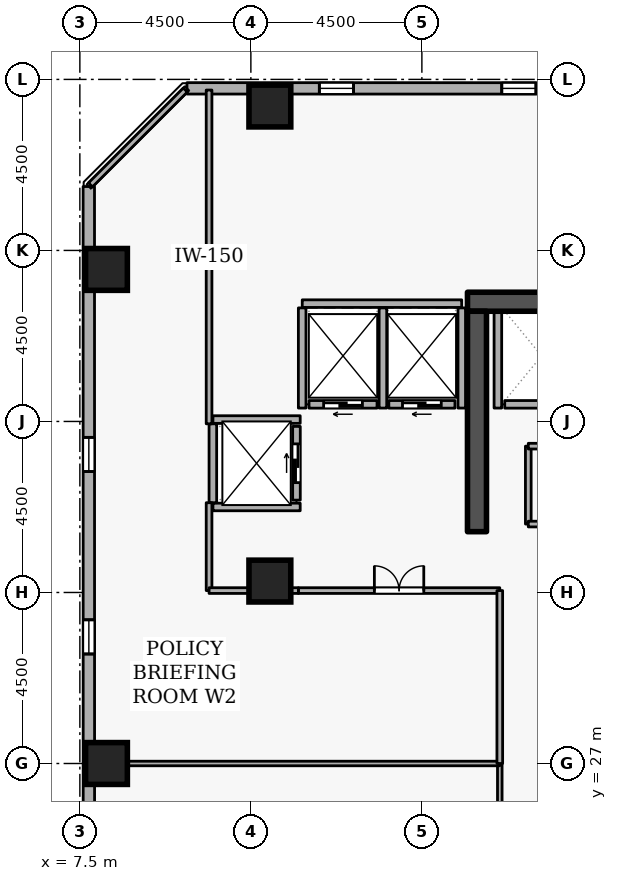
"""IFC4 building model, lengths in metres.
Left out: names, types, materials, properties, quantities, classifications, styles, units other than length and angle.
Written with IfcOpenShell. Run it as: python <this file> out.ifc"""

import sys

from ifc_helpers import new_model, si_unit, direction, frame, frame_2d, origin, origin_2d, place, context, subcontext, project, spatial, rectangle, extrude, element, fill, save


model = new_model("IFC4")
c1 = context("Model", 3, precision=1e-05, world=origin(), true_north=direction((0.0, 1.0)))
c2 = subcontext(c1, "Body", "Model", "MODEL_VIEW")
j1 = project(units=[si_unit("LENGTHUNIT", "METRE"), si_unit("PLANEANGLEUNIT", "RADIAN")], contexts=[c1])
p1 = place(None, origin())
s1 = spatial("IfcSite", under=j1, at=p1, CompositionType="ELEMENT")
p2 = place(p1, origin())
s2 = spatial("IfcBuilding", under=s1, at=p2, CompositionType="ELEMENT")
p3 = place(p2, frame((0.0, 0.0, 152.7)))
s3 = spatial("IfcBuildingStorey", under=s2, at=p3, CompositionType="ELEMENT", Elevation=152.7)
p4 = place(p3, frame((17.7, 39.15, 0.0), z_axis=(0.0, 0.0, 1.0), x_axis=(1.0, 0.0, 0.0)))
e1 = element("IfcWall", 1, at=p4, inside=s3, PredefinedType="SHEAR", context=c2, shape_type="SweptSolid", body=[
    extrude(rectangle(XDim=15.6, YDim=0.5, at=frame_2d((7.8, 0.0))), origin(), (0.0, 0.0, 1.0), 3.6),
])
p5 = place(p3, frame((17.95, 33.1, 0.0), z_axis=(0.0, 0.0, 1.0), x_axis=(0.0, 1.0, 0.0)))
e2 = element("IfcWall", 2, at=p5, inside=s3, PredefinedType="SHEAR", context=c2, shape_type="SweptSolid", body=[
    extrude(rectangle(XDim=5.8, YDim=0.5, at=frame_2d((2.9, 0.0))), origin(), (0.0, 0.0, 1.0), 3.6),
])
for number, where, z_axis, x_axis in (
    (3, (12.5, 44.3, 0.0), (0.0, 0.0, 1.0), (1.0, 0.0, 0.0)),
    (4, (8.2, 27.0, 0.0), (0.0, 0.0, 1.0), (1.0, 0.0, 0.0)),
    (5, (8.2, 40.0, 0.0), (0.0, 0.0, 1.0), (1.0, 0.0, 0.0)),
    (6, (12.5, 31.8, 0.0), (0.0, 0.0, 1.0), (1.0, 0.0, 0.0)),
):
    element("IfcColumn", number, at=place(p3, frame(where, z_axis=z_axis, x_axis=x_axis)), inside=s3, PredefinedType="COLUMN", context=c2, shape_type="SweptSolid", body=[
        extrude(rectangle(XDim=1.1, YDim=1.1, at=origin_2d()), origin(), (0.0, 0.0, 1.0), 3.6),
    ])
p6 = place(p3, frame((45.302, 44.76, 0.0), z_axis=(0.0, 0.0, 1.0), x_axis=(-0.999999991209, 0.000132597301, 0.0)))
e7 = element("IfcWall", 7, at=p6, inside=s3, PredefinedType="STANDARD", context=c2, shape_type="SweptSolid", body=[
    extrude(rectangle(XDim=34.983, YDim=0.3, at=frame_2d((17.492, 0.0))), origin(), (0.0, 0.0, 1.0), 2.7),
])
p7 = place(p6, frame((1.8, 0.0, 0.72)))
e8 = element("IfcOpeningElement", 8, at=p7, cuts=e7, PredefinedType="OPENING", context=c2, shape_type="SweptSolid", body=[
    extrude(rectangle(XDim=0.9, YDim=1.75, at=frame_2d((0.45, 0.875))), frame((0.0, 0.16, 0.0), z_axis=(0.0, -1.0, 0.0), x_axis=(1.0, 0.0, 0.0)), (0.0, 0.0, 1.0), 0.32),
])
p8 = place(p6, frame((11.4, 0.0, 0.72)))
e9 = element("IfcOpeningElement", 9, at=p8, cuts=e7, PredefinedType="OPENING", context=c2, shape_type="SweptSolid", body=[
    extrude(rectangle(XDim=0.9, YDim=1.75, at=frame_2d((0.45, 0.875))), frame((0.0, 0.16, 0.0), z_axis=(0.0, -1.0, 0.0), x_axis=(1.0, 0.0, 0.0)), (0.0, 0.0, 1.0), 0.32),
])
p9 = place(p6, frame((16.2, 0.0, 0.72)))
e10 = element("IfcOpeningElement", 10, at=p9, cuts=e7, PredefinedType="OPENING", context=c2, shape_type="SweptSolid", body=[
    extrude(rectangle(XDim=0.9, YDim=1.75, at=frame_2d((0.45, 0.875))), frame((0.0, 0.16, 0.0), z_axis=(0.0, -1.0, 0.0), x_axis=(1.0, 0.0, 0.0)), (0.0, 0.0, 1.0), 0.32),
])
p10 = place(p6, frame((21.0, 0.0, 0.72)))
e11 = element("IfcOpeningElement", 11, at=p10, cuts=e7, PredefinedType="OPENING", context=c2, shape_type="SweptSolid", body=[
    extrude(rectangle(XDim=0.9, YDim=1.75, at=frame_2d((0.45, 0.875))), frame((0.0, 0.16, 0.0), z_axis=(0.0, -1.0, 0.0), x_axis=(1.0, 0.0, 0.0)), (0.0, 0.0, 1.0), 0.32),
])
p11 = place(p6, frame((25.8, 0.0, 0.72)))
e12 = element("IfcOpeningElement", 12, at=p11, cuts=e7, PredefinedType="OPENING", context=c2, shape_type="SweptSolid", body=[
    extrude(rectangle(XDim=0.9, YDim=1.75, at=frame_2d((0.45, 0.875))), frame((0.0, 0.16, 0.0), z_axis=(0.0, -1.0, 0.0), x_axis=(1.0, 0.0, 0.0)), (0.0, 0.0, 1.0), 0.32),
])
p12 = place(p6, frame((30.6, 0.0, 0.72)))
e13 = element("IfcOpeningElement", 13, at=p12, cuts=e7, PredefinedType="OPENING", context=c2, shape_type="SweptSolid", body=[
    extrude(rectangle(XDim=0.9, YDim=1.75, at=frame_2d((0.45, 0.875))), frame((0.0, 0.16, 0.0), z_axis=(0.0, -1.0, 0.0), x_axis=(1.0, 0.0, 0.0)), (0.0, 0.0, 1.0), 0.32),
])
p13 = place(p3, frame((7.735, 42.181, 0.0), z_axis=(0.0, 0.0, 1.0), x_axis=(0.000132597301, -0.999999991209, 0.0)))
e14 = element("IfcWall", 14, at=p13, inside=s3, PredefinedType="STANDARD", context=c2, shape_type="SweptSolid", body=[
    extrude(rectangle(XDim=34.983, YDim=0.3, at=frame_2d((17.492, 0.0))), origin(), (0.0, 0.0, 1.0), 2.7),
])
p14 = place(p13, frame((6.6, 0.0, 0.72)))
e15 = element("IfcOpeningElement", 15, at=p14, cuts=e14, PredefinedType="OPENING", context=c2, shape_type="SweptSolid", body=[
    extrude(rectangle(XDim=0.9, YDim=1.75, at=frame_2d((0.45, 0.875))), frame((0.0, 0.16, 0.0), z_axis=(0.0, -1.0, 0.0), x_axis=(1.0, 0.0, 0.0)), (0.0, 0.0, 1.0), 0.32),
])
p15 = place(p13, frame((11.4, 0.0, 0.72)))
e16 = element("IfcOpeningElement", 16, at=p15, cuts=e14, PredefinedType="OPENING", context=c2, shape_type="SweptSolid", body=[
    extrude(rectangle(XDim=0.9, YDim=1.75, at=frame_2d((0.45, 0.875))), frame((0.0, 0.16, 0.0), z_axis=(0.0, -1.0, 0.0), x_axis=(1.0, 0.0, 0.0)), (0.0, 0.0, 1.0), 0.32),
])
p16 = place(p13, frame((21.0, 0.0, 0.72)))
e17 = element("IfcOpeningElement", 17, at=p16, cuts=e14, PredefinedType="OPENING", context=c2, shape_type="SweptSolid", body=[
    extrude(rectangle(XDim=0.9, YDim=1.75, at=frame_2d((0.45, 0.875))), frame((0.0, 0.16, 0.0), z_axis=(0.0, -1.0, 0.0), x_axis=(1.0, 0.0, 0.0)), (0.0, 0.0, 1.0), 0.32),
])
p17 = place(p13, frame((25.8, 0.0, 0.72)))
e18 = element("IfcOpeningElement", 18, at=p17, cuts=e14, PredefinedType="OPENING", context=c2, shape_type="SweptSolid", body=[
    extrude(rectangle(XDim=0.9, YDim=1.75, at=frame_2d((0.45, 0.875))), frame((0.0, 0.16, 0.0), z_axis=(0.0, -1.0, 0.0), x_axis=(1.0, 0.0, 0.0)), (0.0, 0.0, 1.0), 0.32),
])
p18 = place(p13, frame((30.6, 0.0, 0.72)))
e19 = element("IfcOpeningElement", 19, at=p18, cuts=e14, PredefinedType="OPENING", context=c2, shape_type="SweptSolid", body=[
    extrude(rectangle(XDim=0.9, YDim=1.75, at=frame_2d((0.45, 0.875))), frame((0.0, 0.16, 0.0), z_axis=(0.0, -1.0, 0.0), x_axis=(1.0, 0.0, 0.0)), (0.0, 0.0, 1.0), 0.32),
])
p19 = place(p3, frame((20.62, 36.45, 0.0), z_axis=(0.0, 0.0, 1.0), x_axis=(-1.0, 0.0, 0.0)))
e20 = element("IfcWall", 20, at=p19, inside=s3, PredefinedType="STANDARD", context=c2, shape_type="SweptSolid", body=[
    extrude(rectangle(XDim=1.94, YDim=0.2, at=frame_2d((0.97, 0.0))), origin(), (0.0, 0.0, 1.0), 3.34),
])
p20 = place(p3, frame((17.37, 36.45, 0.0), z_axis=(0.0, 0.0, 1.0), x_axis=(-1.0, 0.0, 0.0)))
e21 = element("IfcWall", 21, at=p20, inside=s3, PredefinedType="STANDARD", context=c2, shape_type="SweptSolid", body=[
    extrude(rectangle(XDim=1.74, YDim=0.2, at=frame_2d((0.87, 0.0))), origin(), (0.0, 0.0, 1.0), 3.34),
])
p21 = place(p20, frame((0.36, 0.0, 0.0)))
e22 = element("IfcOpeningElement", 22, at=p21, cuts=e21, PredefinedType="OPENING", context=c2, shape_type="SweptSolid", body=[
    extrude(rectangle(XDim=1.02, YDim=2.06, at=frame_2d((0.51, 1.03))), frame((0.0, 0.11, 0.0), z_axis=(0.0, -1.0, 0.0), x_axis=(1.0, 0.0, 0.0)), (0.0, 0.0, 1.0), 0.22),
])
p22 = place(p3, frame((15.32, 36.45, 0.0), z_axis=(0.0, 0.0, 1.0), x_axis=(-1.0, 0.0, 0.0)))
e23 = element("IfcWall", 23, at=p22, inside=s3, PredefinedType="STANDARD", context=c2, shape_type="SweptSolid", body=[
    extrude(rectangle(XDim=1.79, YDim=0.2, at=frame_2d((0.895, 0.0))), origin(), (0.0, 0.0, 1.0), 3.34),
])
p23 = place(p22, frame((0.385, 0.0, 0.0)))
e24 = element("IfcOpeningElement", 24, at=p23, cuts=e23, PredefinedType="OPENING", context=c2, shape_type="SweptSolid", body=[
    extrude(rectangle(XDim=1.02, YDim=2.06, at=frame_2d((0.51, 1.03))), frame((0.0, 0.11, 0.0), z_axis=(0.0, -1.0, 0.0), x_axis=(1.0, 0.0, 0.0)), (0.0, 0.0, 1.0), 0.22),
])
p24 = place(p3, frame((13.2, 33.93, 0.0), z_axis=(0.0, 0.0, 1.0), x_axis=(0.0, 1.0, 0.0)))
e25 = element("IfcWall", 25, at=p24, inside=s3, PredefinedType="STANDARD", context=c2, shape_type="SweptSolid", body=[
    extrude(rectangle(XDim=1.94, YDim=0.2, at=frame_2d((0.97, 0.0))), origin(), (0.0, 0.0, 1.0), 3.34),
])
p25 = place(p24, frame((0.46, 0.0, 0.0)))
e26 = element("IfcOpeningElement", 26, at=p25, cuts=e25, PredefinedType="OPENING", context=c2, shape_type="SweptSolid", body=[
    extrude(rectangle(XDim=1.02, YDim=2.06, at=frame_2d((0.51, 1.03))), frame((0.0, 0.11, 0.0), z_axis=(0.0, -1.0, 0.0), x_axis=(1.0, 0.0, 0.0)), (0.0, 0.0, 1.0), 0.22),
])
p26 = place(p3, frame((18.5, 36.352, 0.0), z_axis=(0.0, 0.0, 1.0), x_axis=(0.0, 1.0, 0.0)))
e27 = element("IfcWall", 27, at=p26, inside=s3, PredefinedType="STANDARD", context=c2, shape_type="SweptSolid", body=[
    extrude(rectangle(XDim=2.536, YDim=0.2, at=frame_2d((1.268, 0.0))), origin(), (0.0, 0.0, 1.0), 3.34),
])
p27 = place(p3, frame((13.352, 39.1, 0.0), z_axis=(0.0, 0.0, 1.0), x_axis=(1.0, 0.0, 0.0)))
e28 = element("IfcWall", 28, at=p27, inside=s3, PredefinedType="STANDARD", context=c2, shape_type="SweptSolid", body=[
    extrude(rectangle(XDim=4.196, YDim=0.2, at=frame_2d((2.098, 0.0))), origin(), (0.0, 0.0, 1.0), 3.34),
])
p28 = place(p3, frame((17.55, 36.352, 0.0), z_axis=(0.0, 0.0, 1.0), x_axis=(0.0, 1.0, 0.0)))
e29 = element("IfcWall", 29, at=p28, inside=s3, PredefinedType="STANDARD", context=c2, shape_type="SweptSolid", body=[
    extrude(rectangle(XDim=2.636, YDim=0.2, at=frame_2d((1.318, 0.0))), origin(), (0.0, 0.0, 1.0), 2.545),
])
for number, where, z_axis, x_axis in (
    (30, (15.475, 36.352, 0.0), (0.0, 0.0, 1.0), (0.0, 1.0, 0.0)),
    (31, (13.35, 36.352, 0.0), (0.0, 0.0, 1.0), (0.0, 1.0, 0.0)),
):
    element("IfcWall", number, at=place(p3, frame(where, z_axis=z_axis, x_axis=x_axis)), inside=s3, PredefinedType="STANDARD", context=c2, shape_type="SweptSolid", body=[
        extrude(rectangle(XDim=2.636, YDim=0.2, at=frame_2d((1.318, 0.0))), origin(), (0.0, 0.0, 1.0), 3.34),
    ])
for number, where, z_axis, x_axis in (
    (32, (11.002, 36.05, 0.0), (0.0, 0.0, 1.0), (1.0, 0.0, 0.0)),
    (33, (11.002, 33.75, 0.0), (0.0, 0.0, 1.0), (1.0, 0.0, 0.0)),
):
    element("IfcWall", number, at=place(p3, frame(where, z_axis=z_axis, x_axis=x_axis)), inside=s3, PredefinedType="STANDARD", context=c2, shape_type="SweptSolid", body=[
        extrude(rectangle(XDim=2.296, YDim=0.2, at=frame_2d((1.148, 0.0))), origin(), (0.0, 0.0, 1.0), 3.34),
    ])
p29 = place(p3, frame((11.0, 33.862, 0.0), z_axis=(0.0, 0.0, 1.0), x_axis=(0.0, 1.0, 0.0)))
e34 = element("IfcWall", 34, at=p29, inside=s3, PredefinedType="STANDARD", context=c2, shape_type="SweptSolid", body=[
    extrude(rectangle(XDim=2.076, YDim=0.2, at=frame_2d((1.038, 0.0))), origin(), (0.0, 0.0, 1.0), 3.34),
])
p30 = place(p3, frame((19.3, 33.3, 0.0), z_axis=(0.0, 0.0, 1.0), x_axis=(0.0, 1.0, 0.0)))
e35 = element("IfcWall", 35, at=p30, inside=s3, PredefinedType="PARTITIONING", context=c2, shape_type="SweptSolid", body=[
    extrude(rectangle(XDim=2.05, YDim=0.15, at=frame_2d((1.025, 0.0))), origin(), (0.0, 0.0, 1.0), 3.34),
])
p31 = place(p3, frame((19.3, 35.35, 0.0), z_axis=(0.0, 0.0, 1.0), x_axis=(1.0, 0.0, 0.0)))
e36 = element("IfcWall", 36, at=p31, inside=s3, PredefinedType="PARTITIONING", context=c2, shape_type="SweptSolid", body=[
    extrude(rectangle(XDim=3.25, YDim=0.15, at=frame_2d((1.625, 0.0))), origin(), (0.0, 0.0, 1.0), 3.34),
])
p32 = place(p3, frame((22.55, 33.3, 0.0), z_axis=(0.0, 0.0, 1.0), x_axis=(-1.0, 0.0, 0.0)))
e37 = element("IfcWall", 37, at=p32, inside=s3, PredefinedType="PARTITIONING", context=c2, shape_type="SweptSolid", body=[
    extrude(rectangle(XDim=3.25, YDim=0.15, at=frame_2d((1.625, 0.0))), origin(), (0.0, 0.0, 1.0), 3.34),
])
p33 = place(p32, frame((1.165, 0.0, 0.0)))
e38 = element("IfcOpeningElement", 38, at=p33, cuts=e37, PredefinedType="OPENING", context=c2, shape_type="SweptSolid", body=[
    extrude(rectangle(XDim=0.92, YDim=2.08, at=frame_2d((0.46, 1.04))), frame((0.0, 0.085, 0.0), z_axis=(0.0, -1.0, 0.0), x_axis=(1.0, 0.0, 0.0)), (0.0, 0.0, 1.0), 0.17),
])
p34 = place(p3, frame((18.55, 27.0, 0.0), z_axis=(0.0, 0.0, 1.0), x_axis=(0.0, -1.0, 0.0)))
e39 = element("IfcWall", 39, at=p34, inside=s3, PredefinedType="PARTITIONING", context=c2, shape_type="SweptSolid", body=[
    extrude(rectangle(XDim=4.55, YDim=0.12, at=frame_2d((2.275, 0.0))), origin(), (0.0, 0.0, 1.0), 3.34),
])
p35 = place(p3, frame((7.78, 27.0, 0.0), z_axis=(0.0, 0.0, 1.0), x_axis=(1.0, 0.0, 0.0)))
e40 = element("IfcWall", 40, at=p35, inside=s3, PredefinedType="PARTITIONING", context=c2, shape_type="SweptSolid", body=[
    extrude(rectangle(XDim=10.77, YDim=0.12, at=frame_2d((5.385, 0.0))), origin(), (0.0, 0.0, 1.0), 2.932),
])
p36 = place(p3, frame((13.25, 31.55, 0.0), z_axis=(0.0, 0.0, 1.0), x_axis=(1.0, 0.0, 0.0)))
e41 = element("IfcWall", 41, at=p36, inside=s3, PredefinedType="PARTITIONING", context=c2, shape_type="SweptSolid", body=[
    extrude(rectangle(XDim=5.3, YDim=0.15, at=frame_2d((2.65, 0.0))), origin(), (0.0, 0.0, 1.0), 3.34),
])
p37 = place(p36, frame((2.0, 0.0, 0.0)))
e42 = element("IfcOpeningElement", 42, at=p37, cuts=e41, PredefinedType="OPENING", context=c2, shape_type="SweptSolid", body=[
    extrude(rectangle(XDim=1.3, YDim=2.12, at=frame_2d((0.65, 1.06))), frame((0.0, 0.085, 0.0), z_axis=(0.0, -1.0, 0.0), x_axis=(1.0, 0.0, 0.0)), (0.0, 0.0, 1.0), 0.17),
])
p38 = place(p3, frame((18.55, 31.55, 0.0), z_axis=(0.0, 0.0, 1.0), x_axis=(0.0, -1.0, 0.0)))
e43 = element("IfcWall", 43, at=p38, inside=s3, PredefinedType="PARTITIONING", context=c2, shape_type="SweptSolid", body=[
    extrude(rectangle(XDim=4.55, YDim=0.15, at=frame_2d((2.275, 0.0))), origin(), (0.0, 0.0, 1.0), 3.34),
])
p39 = place(p3, frame((7.78, 42.225, 0.0), z_axis=(0.0, 0.0, 1.0), x_axis=(0.707106781187, 0.707106781187, 0.0)))
e44 = element("IfcWall", 44, at=p39, inside=s3, PredefinedType="PARTITIONING", context=c2, shape_type="SweptSolid", body=[
    extrude(rectangle(XDim=3.528, YDim=0.15, at=frame_2d((1.764, 0.0))), origin(), (0.0, 0.0, 1.0), 3.34),
])
p40 = place(p3, frame((10.9, 44.72, 0.0), z_axis=(0.0, 0.0, 1.0), x_axis=(0.0, -1.0, 0.0)))
e45 = element("IfcWall", 45, at=p40, inside=s3, PredefinedType="PARTITIONING", context=c2, shape_type="SweptSolid", body=[
    extrude(rectangle(XDim=8.782, YDim=0.15, at=frame_2d((4.391, 0.0))), origin(), (0.0, 0.0, 1.0), 3.34),
])
p41 = place(p3, frame((10.9, 33.862, 0.0), z_axis=(0.0, 0.0, 1.0), x_axis=(0.0, -1.0, 0.0)))
e46 = element("IfcWall", 46, at=p41, inside=s3, PredefinedType="PARTITIONING", context=c2, shape_type="SweptSolid", body=[
    extrude(rectangle(XDim=2.312, YDim=0.15, at=frame_2d((1.156, 0.0))), origin(), (0.0, 0.0, 1.0), 3.34),
])
p42 = place(p3, frame((10.9, 31.55, 0.0), z_axis=(0.0, 0.0, 1.0), x_axis=(1.0, 0.0, 0.0)))
e47 = element("IfcWall", 47, at=p42, inside=s3, PredefinedType="PARTITIONING", context=c2, shape_type="SweptSolid", body=[
    extrude(rectangle(XDim=2.35, YDim=0.15, at=frame_2d((1.175, 0.0))), origin(), (0.0, 0.0, 1.0), 3.34),
])
p43 = place(p11, origin())
e48 = element("IfcWindow", 48, at=p43, inside=s3, PartitioningType="SINGLE_PANEL", PredefinedType="WINDOW", context=c2, shape_type="SweptSolid", body=[
    extrude(rectangle(XDim=0.9, YDim=1.75, at=frame_2d((0.45, 0.875))), frame((0.0, 0.03, 0.0), z_axis=(0.0, -1.0, 0.0), x_axis=(1.0, 0.0, 0.0)), (0.0, 0.0, 1.0), 0.06),
])
fill(e12, e48)
p44 = place(p12, origin())
e49 = element("IfcWindow", 49, at=p44, inside=s3, PartitioningType="SINGLE_PANEL", PredefinedType="WINDOW", context=c2, shape_type="SweptSolid", body=[
    extrude(rectangle(XDim=0.9, YDim=1.75, at=frame_2d((0.45, 0.875))), frame((0.0, 0.03, 0.0), z_axis=(0.0, -1.0, 0.0), x_axis=(1.0, 0.0, 0.0)), (0.0, 0.0, 1.0), 0.06),
])
fill(e13, e49)
p45 = place(p14, origin())
e50 = element("IfcWindow", 50, at=p45, inside=s3, PartitioningType="SINGLE_PANEL", PredefinedType="WINDOW", context=c2, shape_type="SweptSolid", body=[
    extrude(rectangle(XDim=0.9, YDim=1.75, at=frame_2d((0.45, 0.875))), frame((0.0, 0.03, 0.0), z_axis=(0.0, -1.0, 0.0), x_axis=(1.0, 0.0, 0.0)), (0.0, 0.0, 1.0), 0.06),
])
fill(e15, e50)
p46 = place(p15, origin())
e51 = element("IfcWindow", 51, at=p46, inside=s3, PartitioningType="SINGLE_PANEL", PredefinedType="WINDOW", context=c2, shape_type="SweptSolid", body=[
    extrude(rectangle(XDim=0.9, YDim=1.75, at=frame_2d((0.45, 0.875))), frame((0.0, 0.03, 0.0), z_axis=(0.0, -1.0, 0.0), x_axis=(1.0, 0.0, 0.0)), (0.0, 0.0, 1.0), 0.06),
])
fill(e16, e51)
p47 = place(p21, origin())
e52 = element("IfcDoor", 52, at=p47, inside=s3, OperationType="SLIDING_TO_LEFT", PredefinedType="DOOR", context=c2, shape_type="SweptSolid", body=[
    extrude(rectangle(XDim=1.02, YDim=2.06, at=frame_2d((0.51, 1.03))), frame((0.0, 0.025, 0.0), z_axis=(0.0, -1.0, 0.0), x_axis=(1.0, 0.0, 0.0)), (0.0, 0.0, 1.0), 0.05),
])
fill(e22, e52)
p48 = place(p23, origin())
e53 = element("IfcDoor", 53, at=p48, inside=s3, OperationType="SLIDING_TO_LEFT", PredefinedType="DOOR", context=c2, shape_type="SweptSolid", body=[
    extrude(rectangle(XDim=1.02, YDim=2.06, at=frame_2d((0.51, 1.03))), frame((0.0, 0.025, 0.0), z_axis=(0.0, -1.0, 0.0), x_axis=(1.0, 0.0, 0.0)), (0.0, 0.0, 1.0), 0.05),
])
fill(e24, e53)
p49 = place(p25, origin())
e54 = element("IfcDoor", 54, at=p49, inside=s3, OperationType="SLIDING_TO_LEFT", PredefinedType="DOOR", context=c2, shape_type="SweptSolid", body=[
    extrude(rectangle(XDim=1.02, YDim=2.06, at=frame_2d((0.51, 1.03))), frame((0.0, 0.025, 0.0), z_axis=(0.0, -1.0, 0.0), x_axis=(1.0, 0.0, 0.0)), (0.0, 0.0, 1.0), 0.05),
])
fill(e26, e54)
p50 = place(p37, origin())
e55 = element("IfcDoor", 55, at=p50, inside=s3, OperationType="DOUBLE_DOOR_SINGLE_SWING", PredefinedType="DOOR", context=c2, shape_type="SweptSolid", body=[
    extrude(rectangle(XDim=1.3, YDim=2.12, at=frame_2d((0.65, 1.06))), frame((0.0, 0.025, 0.0), z_axis=(0.0, -1.0, 0.0), x_axis=(1.0, 0.0, 0.0)), (0.0, 0.0, 1.0), 0.05),
])
fill(e42, e55)
save(model, sys.argv[1])
